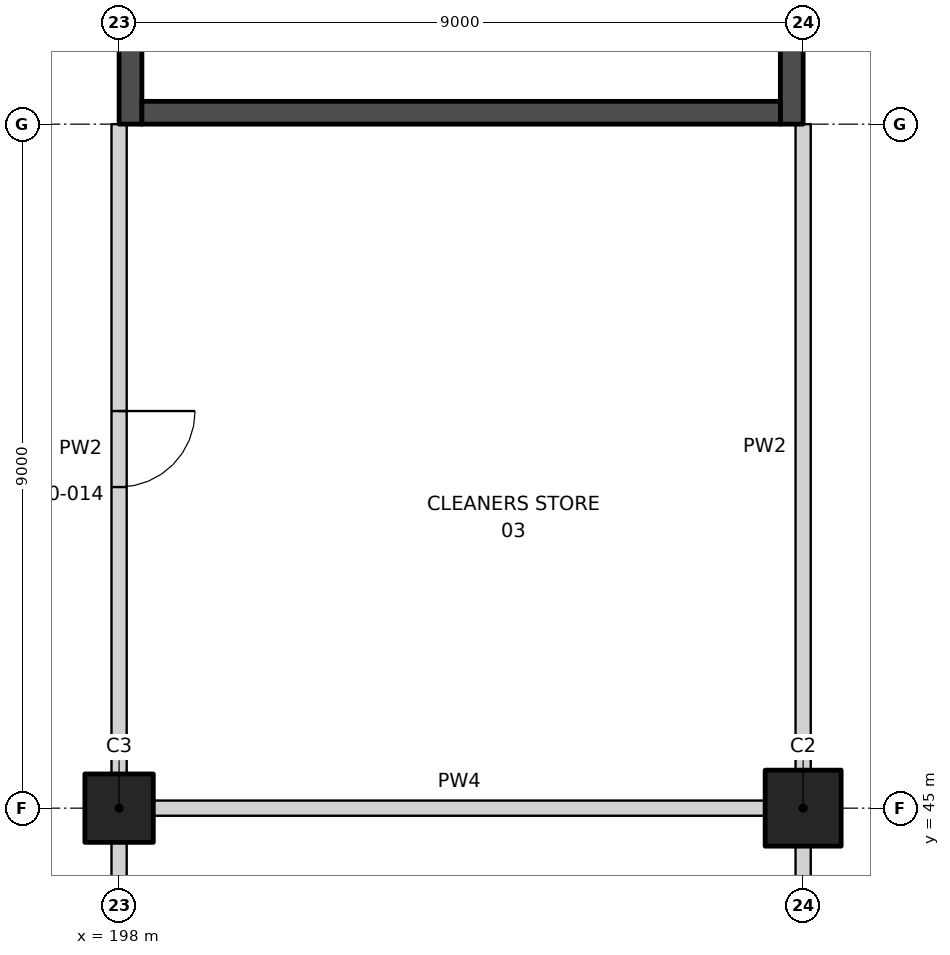
"""IFC4 building model, lengths in metres.
Left out: names, types, materials, properties, quantities, classifications, styles, units other than length and angle.
Written with IfcOpenShell. Run it as: python <this file> out.ifc"""

import sys

from ifc_helpers import new_model, si_unit, direction, frame, frame_2d, origin, origin_2d, place, context, subcontext, project, spatial, rectangle, extrude, element, fill, save


model = new_model("IFC4")
c1 = context("Model", 3, precision=1e-05, world=origin(), true_north=direction((0.0, 1.0)))
c2 = subcontext(c1, "Body", "Model", "MODEL_VIEW")
j1 = project(units=[si_unit("LENGTHUNIT", "METRE"), si_unit("PLANEANGLEUNIT", "RADIAN")], contexts=[c1])
p1 = place(None, origin())
s1 = spatial("IfcSite", under=j1, at=p1, CompositionType="ELEMENT")
p2 = place(p1, origin())
s2 = spatial("IfcBuilding", under=s1, at=p2, CompositionType="ELEMENT")
p3 = place(p2, origin())
s3 = spatial("IfcBuildingStorey", under=s2, at=p3, CompositionType="ELEMENT", Elevation=0.0)
p4 = place(p3, frame((207.0, 45.0, 0.0), z_axis=(0.0, 0.0, 1.0), x_axis=(1.0, 0.0, 0.0)))
e1 = element("IfcColumn", 1, at=p4, inside=s3, PredefinedType="COLUMN", context=c2, shape_type="SweptSolid", body=[
    extrude(rectangle(XDim=1.0, YDim=1.0, at=origin_2d()), origin(), (0.0, 0.0, 1.0), 7.0),
])
p5 = place(p3, frame((198.0, 45.0, 0.0), z_axis=(0.0, 0.0, 1.0), x_axis=(1.0, 0.0, 0.0)))
e2 = element("IfcColumn", 2, at=p5, inside=s3, PredefinedType="COLUMN", context=c2, shape_type="SweptSolid", body=[
    extrude(rectangle(XDim=0.9, YDim=0.9, at=origin_2d()), origin(), (0.0, 0.0, 1.0), 7.0),
])
p6 = place(p3, frame((198.45, 45.0, 0.0), z_axis=(0.0, 0.0, 1.0), x_axis=(1.0, 0.0, 0.0)))
e3 = element("IfcWall", 3, at=p6, inside=s3, PredefinedType="PARTITIONING", context=c2, shape_type="SweptSolid", body=[
    extrude(rectangle(XDim=8.05, YDim=0.2, at=frame_2d((4.025, 0.0))), origin(), (0.0, 0.0, 1.0), 5.75),
])
p7 = place(p3, frame((198.0, 36.45, 0.0), z_axis=(0.0, 0.0, 1.0), x_axis=(0.0, 1.0, 0.0)))
e4 = element("IfcWall", 4, at=p7, inside=s3, PredefinedType="PARTITIONING", context=c2, shape_type="SweptSolid", body=[
    extrude(rectangle(XDim=8.1, YDim=0.2, at=frame_2d((4.05, 0.0))), origin(), (0.0, 0.0, 1.0), 5.75),
])
p8 = place(p7, frame((3.55, 0.0, 0.0)))
e5 = element("IfcOpeningElement", 5, at=p8, cuts=e4, PredefinedType="OPENING", context=c2, shape_type="SweptSolid", body=[
    extrude(rectangle(XDim=1.0, YDim=2.1, at=frame_2d((0.5, 1.05))), frame((0.0, 0.11, 0.0), z_axis=(0.0, -1.0, 0.0), x_axis=(1.0, 0.0, 0.0)), (0.0, 0.0, 1.0), 0.22),
])
p9 = place(p3, frame((198.0, 45.45, 0.0), z_axis=(0.0, 0.0, 1.0), x_axis=(0.0, 1.0, 0.0)))
e6 = element("IfcWall", 6, at=p9, inside=s3, PredefinedType="PARTITIONING", context=c2, shape_type="SweptSolid", body=[
    extrude(rectangle(XDim=8.55, YDim=0.2, at=frame_2d((4.275, 0.0))), origin(), (0.0, 0.0, 1.0), 5.65),
])
p10 = place(p9, frame((3.775, 0.0, 0.0)))
e7 = element("IfcOpeningElement", 7, at=p10, cuts=e6, PredefinedType="OPENING", context=c2, shape_type="SweptSolid", body=[
    extrude(rectangle(XDim=1.0, YDim=2.1, at=frame_2d((0.5, 1.05))), frame((0.0, 0.11, 0.0), z_axis=(0.0, -1.0, 0.0), x_axis=(1.0, 0.0, 0.0)), (0.0, 0.0, 1.0), 0.22),
])
p11 = place(p3, frame((207.0, 36.5, 0.0), z_axis=(0.0, 0.0, 1.0), x_axis=(0.0, 1.0, 0.0)))
e8 = element("IfcWall", 8, at=p11, inside=s3, PredefinedType="PARTITIONING", context=c2, shape_type="SweptSolid", body=[
    extrude(rectangle(XDim=8.0, YDim=0.2, at=frame_2d((4.0, 0.0))), origin(), (0.0, 0.0, 1.0), 5.75),
])
p12 = place(p3, frame((207.0, 45.5, 0.0), z_axis=(0.0, 0.0, 1.0), x_axis=(0.0, 1.0, 0.0)))
e9 = element("IfcWall", 9, at=p12, inside=s3, PredefinedType="PARTITIONING", context=c2, shape_type="SweptSolid", body=[
    extrude(rectangle(XDim=8.5, YDim=0.2, at=frame_2d((4.25, 0.0))), origin(), (0.0, 0.0, 1.0), 5.75),
])
p13 = place(p3, frame((198.15, 54.0, 0.0), z_axis=(0.0, 0.0, 1.0), x_axis=(0.0, 1.0, 0.0)))
e10 = element("IfcWall", 10, at=p13, inside=s3, PredefinedType="SHEAR", context=c2, shape_type="SweptSolid", body=[
    extrude(rectangle(XDim=18.0, YDim=0.3, at=frame_2d((9.0, 0.0))), origin(), (0.0, 0.0, 1.0), 7.0),
])
p14 = place(p13, frame((8.6, 0.0, 0.0)))
e11 = element("IfcOpeningElement", 11, at=p14, cuts=e10, PredefinedType="OPENING", context=c2, shape_type="SweptSolid", body=[
    extrude(rectangle(XDim=1.2, YDim=2.1, at=frame_2d((0.6, 1.05))), frame((0.0, 0.16, 0.0), z_axis=(0.0, -1.0, 0.0), x_axis=(1.0, 0.0, 0.0)), (0.0, 0.0, 1.0), 0.32),
])
p15 = place(p3, frame((206.85, 54.0, 0.0), z_axis=(0.0, 0.0, 1.0), x_axis=(0.0, 1.0, 0.0)))
e12 = element("IfcWall", 12, at=p15, inside=s3, PredefinedType="SHEAR", context=c2, shape_type="SweptSolid", body=[
    extrude(rectangle(XDim=18.0, YDim=0.3, at=frame_2d((9.0, 0.0))), origin(), (0.0, 0.0, 1.0), 7.0),
])
p16 = place(p3, frame((198.3, 54.15, 0.0), z_axis=(0.0, 0.0, 1.0), x_axis=(1.0, 0.0, 0.0)))
e13 = element("IfcWall", 13, at=p16, inside=s3, PredefinedType="SHEAR", context=c2, shape_type="SweptSolid", body=[
    extrude(rectangle(XDim=8.4, YDim=0.3, at=frame_2d((4.2, 0.0))), origin(), (0.0, 0.0, 1.0), 7.0),
])
p17 = place(p10, frame((1.0, 0.0, 0.0), z_axis=(0.0, 0.0, 1.0), x_axis=(-1.0, 0.0, 0.0)))
e14 = element("IfcDoor", 14, at=p17, inside=s3, OperationType="SINGLE_SWING_LEFT", PredefinedType="DOOR", context=c2, shape_type="SweptSolid", body=[
    extrude(rectangle(XDim=1.0, YDim=2.1, at=frame_2d((0.5, 1.05))), frame((0.0, 0.025, 0.0), z_axis=(0.0, -1.0, 0.0), x_axis=(1.0, 0.0, 0.0)), (0.0, 0.0, 1.0), 0.05),
])
fill(e7, e14)
save(model, sys.argv[1])
